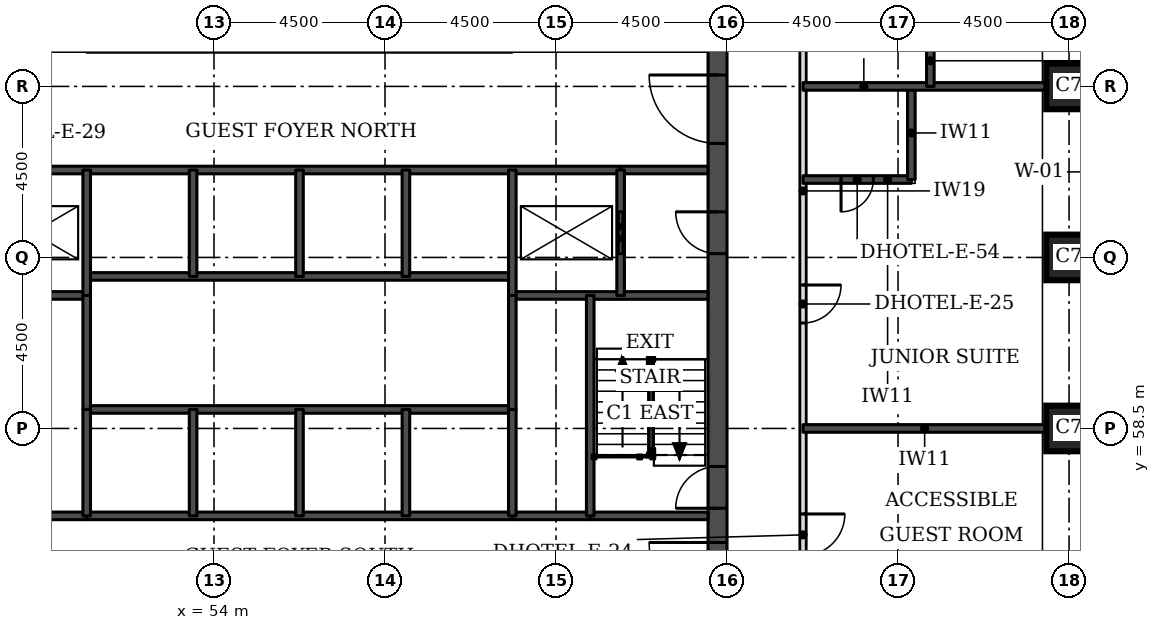
"""IFC4 building model, lengths in metres.
Left out: names, types, materials, properties, quantities, classifications, styles, units other than length and angle.
Written with IfcOpenShell. Run it as: python <this file> out.ifc"""

import sys

from ifc_helpers import new_model, si_unit, direction, frame, frame_2d, origin, origin_2d, place, context, subcontext, project, spatial, rectangle, extrude, element, fill, save


model = new_model("IFC4")
c1 = context("Model", 3, precision=1e-05, world=origin(), true_north=direction((0.0, 1.0)))
c2 = subcontext(c1, "Body", "Model", "MODEL_VIEW")
j1 = project(units=[si_unit("LENGTHUNIT", "METRE"), si_unit("PLANEANGLEUNIT", "RADIAN")], contexts=[c1])
p1 = place(None, origin())
s1 = spatial("IfcSite", under=j1, at=p1, CompositionType="ELEMENT")
p2 = place(p1, origin())
s2 = spatial("IfcBuilding", under=s1, at=p2, CompositionType="ELEMENT")
p3 = place(p2, frame((0.0, 0.0, 62.7)))
s3 = spatial("IfcBuildingStorey", under=s2, at=p3, CompositionType="ELEMENT", Elevation=62.7)
for number, where, z_axis, x_axis in (
    (1, (76.5, 58.5, 0.0), (0.0, 0.0, 1.0), (1.0, 0.0, 0.0)),
    (2, (76.5, 63.0, 0.0), (0.0, 0.0, 1.0), (1.0, 0.0, 0.0)),
    (3, (76.5, 67.5, 0.0), (0.0, 0.0, 1.0), (1.0, 0.0, 0.0)),
):
    element("IfcColumn", number, at=place(p3, frame(where, z_axis=z_axis, x_axis=x_axis)), inside=s3, PredefinedType="COLUMN", context=c2, shape_type="SweptSolid", body=[
        extrude(rectangle(XDim=1.2, YDim=1.2, at=origin_2d()), origin(), (0.0, 0.0, 1.0), 3.3),
    ])
p4 = place(p3, frame((67.25, 49.5, 0.0), z_axis=(0.0, 0.0, 1.0), x_axis=(0.0, 1.0, 0.0)))
e4 = element("IfcWall", 4, at=p4, inside=s3, PredefinedType="SHEAR", context=c2, shape_type="SweptSolid", body=[
    extrude(rectangle(XDim=22.5, YDim=0.5, at=frame_2d((11.25, 0.0))), origin(), (0.0, 0.0, 1.0), 3.3),
])
p5 = place(p4, frame((4.2, 0.0, 0.0)))
e5 = element("IfcOpeningElement", 5, at=p5, cuts=e4, PredefinedType="OPENING", context=c2, shape_type="SweptSolid", body=[
    extrude(rectangle(XDim=1.8, YDim=2.1, at=frame_2d((0.9, 1.05))), frame((0.0, 0.26, 0.0), z_axis=(0.0, -1.0, 0.0), x_axis=(1.0, 0.0, 0.0)), (0.0, 0.0, 1.0), 0.52),
])
p6 = place(p4, frame((6.9, 0.0, 0.0)))
e6 = element("IfcOpeningElement", 6, at=p6, cuts=e4, PredefinedType="OPENING", context=c2, shape_type="SweptSolid", body=[
    extrude(rectangle(XDim=1.1, YDim=2.1, at=frame_2d((0.55, 1.05))), frame((0.0, 0.26, 0.0), z_axis=(0.0, -1.0, 0.0), x_axis=(1.0, 0.0, 0.0)), (0.0, 0.0, 1.0), 0.52),
])
p7 = place(p4, frame((13.6, 0.0, 0.0)))
e7 = element("IfcOpeningElement", 7, at=p7, cuts=e4, PredefinedType="OPENING", context=c2, shape_type="SweptSolid", body=[
    extrude(rectangle(XDim=1.1, YDim=2.1, at=frame_2d((0.55, 1.05))), frame((0.0, 0.26, 0.0), z_axis=(0.0, -1.0, 0.0), x_axis=(1.0, 0.0, 0.0)), (0.0, 0.0, 1.0), 0.52),
])
p8 = place(p4, frame((16.5, 0.0, 0.0)))
e8 = element("IfcOpeningElement", 8, at=p8, cuts=e4, PredefinedType="OPENING", context=c2, shape_type="SweptSolid", body=[
    extrude(rectangle(XDim=1.8, YDim=2.1, at=frame_2d((0.9, 1.05))), frame((0.0, 0.26, 0.0), z_axis=(0.0, -1.0, 0.0), x_axis=(1.0, 0.0, 0.0)), (0.0, 0.0, 1.0), 0.52),
])
p9 = place(p3, frame((69.5, 47.5, 0.0), z_axis=(0.0, 0.0, 1.0), x_axis=(0.0, 1.0, 0.0)))
e9 = element("IfcWall", 9, at=p9, inside=s3, PredefinedType="PARTITIONING", context=c2, shape_type="SweptSolid", body=[
    extrude(rectangle(XDim=26.5, YDim=0.15, at=frame_2d((13.25, 0.0))), origin(), (0.0, 0.0, 1.0), 3.08),
])
p10 = place(p9, frame((25.053, 0.0, 0.0)))
e10 = element("IfcOpeningElement", 10, at=p10, cuts=e9, PredefinedType="OPENING", context=c2, shape_type="SweptSolid", body=[
    extrude(rectangle(XDim=1.0, YDim=2.1, at=frame_2d((0.5, 1.05))), frame((0.0, 0.085, 0.0), z_axis=(0.0, -1.0, 0.0), x_axis=(1.0, 0.0, 0.0)), (0.0, 0.0, 1.0), 0.17),
])
p11 = place(p9, frame((13.775, 0.0, 0.0)))
e11 = element("IfcOpeningElement", 11, at=p11, cuts=e9, PredefinedType="OPENING", context=c2, shape_type="SweptSolid", body=[
    extrude(rectangle(XDim=1.0, YDim=2.1, at=frame_2d((0.5, 1.05))), frame((0.0, 0.085, 0.0), z_axis=(0.0, -1.0, 0.0), x_axis=(1.0, 0.0, 0.0)), (0.0, 0.0, 1.0), 0.17),
])
p12 = place(p9, frame((7.65, 0.0, 0.0)))
e12 = element("IfcOpeningElement", 12, at=p12, cuts=e9, PredefinedType="OPENING", context=c2, shape_type="SweptSolid", body=[
    extrude(rectangle(XDim=1.1, YDim=2.1, at=frame_2d((0.55, 1.05))), frame((0.0, 0.085, 0.0), z_axis=(0.0, -1.0, 0.0), x_axis=(1.0, 0.0, 0.0)), (0.0, 0.0, 1.0), 0.17),
])
p13 = place(p9, frame((0.447, 0.0, 0.0)))
e13 = element("IfcOpeningElement", 13, at=p13, cuts=e9, PredefinedType="OPENING", context=c2, shape_type="SweptSolid", body=[
    extrude(rectangle(XDim=1.0, YDim=2.1, at=frame_2d((0.5, 1.05))), frame((0.0, 0.085, 0.0), z_axis=(0.0, -1.0, 0.0), x_axis=(1.0, 0.0, 0.0)), (0.0, 0.0, 1.0), 0.17),
])
p14 = place(p3, frame((69.5, 58.5, 0.0), z_axis=(0.0, 0.0, 1.0), x_axis=(1.0, 0.0, 0.0)))
e14 = element("IfcWall", 14, at=p14, inside=s3, PredefinedType="SOLIDWALL", context=c2, shape_type="SweptSolid", body=[
    extrude(rectangle(XDim=6.4, YDim=0.2, at=frame_2d((3.2, 0.0))), origin(), (0.0, 0.0, 1.0), 3.08),
])
p15 = place(p3, frame((69.5, 65.05, 0.0), z_axis=(0.0, 0.0, 1.0), x_axis=(1.0, 0.0, 0.0)))
e15 = element("IfcWall", 15, at=p15, inside=s3, PredefinedType="SOLIDWALL", context=c2, shape_type="SweptSolid", body=[
    extrude(rectangle(XDim=2.85, YDim=0.2, at=frame_2d((1.425, 0.0))), origin(), (0.0, 0.0, 1.0), 3.08),
])
p16 = place(p15, frame((1.0, 0.0, 0.0)))
e16 = element("IfcOpeningElement", 16, at=p16, cuts=e15, PredefinedType="OPENING", context=c2, shape_type="SweptSolid", body=[
    extrude(rectangle(XDim=0.85, YDim=2.1, at=frame_2d((0.425, 1.05))), frame((0.0, 0.11, 0.0), z_axis=(0.0, -1.0, 0.0), x_axis=(1.0, 0.0, 0.0)), (0.0, 0.0, 1.0), 0.22),
])
p17 = place(p3, frame((72.35, 65.05, 0.0), z_axis=(0.0, 0.0, 1.0), x_axis=(0.0, 1.0, 0.0)))
e17 = element("IfcWall", 17, at=p17, inside=s3, PredefinedType="SOLIDWALL", context=c2, shape_type="SweptSolid", body=[
    extrude(rectangle(XDim=2.45, YDim=0.2, at=frame_2d((1.225, 0.0))), origin(), (0.0, 0.0, 1.0), 3.08),
])
p18 = place(p3, frame((69.5, 67.5, 0.0), z_axis=(0.0, 0.0, 1.0), x_axis=(1.0, 0.0, 0.0)))
e18 = element("IfcWall", 18, at=p18, inside=s3, PredefinedType="SOLIDWALL", context=c2, shape_type="SweptSolid", body=[
    extrude(rectangle(XDim=6.4, YDim=0.2, at=frame_2d((3.2, 0.0))), origin(), (0.0, 0.0, 1.0), 3.08),
])
p19 = place(p3, frame((72.85, 67.5, 0.0), z_axis=(0.0, 0.0, 1.0), x_axis=(0.0, 1.0, 0.0)))
e19 = element("IfcWall", 19, at=p19, inside=s3, PredefinedType="SOLIDWALL", context=c2, shape_type="SweptSolid", body=[
    extrude(rectangle(XDim=2.95, YDim=0.2, at=frame_2d((1.475, 0.0))), origin(), (0.0, 0.0, 1.0), 3.08),
])
for number, where, z_axis, x_axis in (
    (20, (48.6, 56.2, 0.0), (0.0, 0.0, 1.0), (1.0, 0.0, 0.0)),
    (21, (61.85, 56.2, 0.0), (0.0, 0.0, 1.0), (1.0, 0.0, 0.0)),
):
    element("IfcWall", number, at=place(p3, frame(where, z_axis=z_axis, x_axis=x_axis)), inside=s3, PredefinedType="SOLIDWALL", context=c2, shape_type="SweptSolid", body=[
        extrude(rectangle(XDim=2.05, YDim=0.2, at=frame_2d((1.025, 0.0))), origin(), (0.0, 0.0, 1.0), 3.08),
    ])
p20 = place(p3, frame((50.65, 56.2, 0.0), z_axis=(0.0, 0.0, 1.0), x_axis=(1.0, 0.0, 0.0)))
e22 = element("IfcWall", 22, at=p20, inside=s3, PredefinedType="SOLIDWALL", context=c2, shape_type="SweptSolid", body=[
    extrude(rectangle(XDim=11.2, YDim=0.2, at=frame_2d((5.6, 0.0))), origin(), (0.0, 0.0, 1.0), 3.08),
])
p21 = place(p3, frame((63.9, 56.2, 0.0), z_axis=(0.0, 0.0, 1.0), x_axis=(1.0, 0.0, 0.0)))
e23 = element("IfcWall", 23, at=p21, inside=s3, PredefinedType="SOLIDWALL", context=c2, shape_type="SweptSolid", body=[
    extrude(rectangle(XDim=3.1, YDim=0.2, at=frame_2d((1.55, 0.0))), origin(), (0.0, 0.0, 1.0), 3.08),
])
p22 = place(p3, frame((50.65, 59.0, 0.0), z_axis=(0.0, 0.0, 1.0), x_axis=(1.0, 0.0, 0.0)))
e24 = element("IfcWall", 24, at=p22, inside=s3, PredefinedType="SOLIDWALL", context=c2, shape_type="SweptSolid", body=[
    extrude(rectangle(XDim=11.2, YDim=0.2, at=frame_2d((5.6, 0.0))), origin(), (0.0, 0.0, 1.0), 3.3),
])
for number, where, z_axis, x_axis in (
    (25, (45.5, 62.0, 0.0), (0.0, 0.0, 1.0), (1.0, 0.0, 0.0)),
    (26, (61.85, 62.0, 0.0), (0.0, 0.0, 1.0), (1.0, 0.0, 0.0)),
):
    element("IfcWall", number, at=place(p3, frame(where, z_axis=z_axis, x_axis=x_axis)), inside=s3, PredefinedType="SOLIDWALL", context=c2, shape_type="SweptSolid", body=[
        extrude(rectangle(XDim=5.15, YDim=0.2, at=frame_2d((2.575, 0.0))), origin(), (0.0, 0.0, 1.0), 3.08),
    ])
p23 = place(p3, frame((50.65, 62.5, 0.0), z_axis=(0.0, 0.0, 1.0), x_axis=(1.0, 0.0, 0.0)))
e27 = element("IfcWall", 27, at=p23, inside=s3, PredefinedType="SOLIDWALL", context=c2, shape_type="SweptSolid", body=[
    extrude(rectangle(XDim=11.2, YDim=0.2, at=frame_2d((5.6, 0.0))), origin(), (0.0, 0.0, 1.0), 3.3),
])
p24 = place(p3, frame((64.7, 65.3, 0.0), z_axis=(0.0, 0.0, 1.0), x_axis=(1.0, 0.0, 0.0)))
e28 = element("IfcWall", 28, at=p24, inside=s3, PredefinedType="SOLIDWALL", context=c2, shape_type="SweptSolid", body=[
    extrude(rectangle(XDim=2.3, YDim=0.2, at=frame_2d((1.15, 0.0))), origin(), (0.0, 0.0, 1.0), 3.08),
])
p25 = place(p3, frame((47.8, 65.3, 0.0), z_axis=(0.0, 0.0, 1.0), x_axis=(1.0, 0.0, 0.0)))
e29 = element("IfcWall", 29, at=p25, inside=s3, PredefinedType="SOLIDWALL", context=c2, shape_type="SweptSolid", body=[
    extrude(rectangle(XDim=16.9, YDim=0.2, at=frame_2d((8.45, 0.0))), origin(), (0.0, 0.0, 1.0), 3.08),
])
p26 = place(p3, frame((50.65, 59.0, 0.0), z_axis=(0.0, 0.0, 1.0), x_axis=(0.0, 1.0, 0.0)))
e30 = element("IfcWall", 30, at=p26, inside=s3, PredefinedType="SOLIDWALL", context=c2, shape_type="SweptSolid", body=[
    extrude(rectangle(XDim=3.0, YDim=0.2, at=frame_2d((1.5, 0.0))), origin(), (0.0, 0.0, 1.0), 3.3),
])
p27 = place(p3, frame((50.65, 56.2, 0.0), z_axis=(0.0, 0.0, 1.0), x_axis=(0.0, 1.0, 0.0)))
e31 = element("IfcWall", 31, at=p27, inside=s3, PredefinedType="SOLIDWALL", context=c2, shape_type="SweptSolid", body=[
    extrude(rectangle(XDim=2.8, YDim=0.2, at=frame_2d((1.4, 0.0))), origin(), (0.0, 0.0, 1.0), 3.08),
])
p28 = place(p3, frame((50.65, 62.0, 0.0), z_axis=(0.0, 0.0, 1.0), x_axis=(0.0, 1.0, 0.0)))
e32 = element("IfcWall", 32, at=p28, inside=s3, PredefinedType="SOLIDWALL", context=c2, shape_type="SweptSolid", body=[
    extrude(rectangle(XDim=3.3, YDim=0.2, at=frame_2d((1.65, 0.0))), origin(), (0.0, 0.0, 1.0), 3.08),
])
for number, where, z_axis, x_axis in (
    (33, (53.45, 56.2, 0.0), (0.0, 0.0, 1.0), (0.0, 1.0, 0.0)),
    (34, (53.45, 62.5, 0.0), (0.0, 0.0, 1.0), (0.0, 1.0, 0.0)),
    (35, (56.25, 56.2, 0.0), (0.0, 0.0, 1.0), (0.0, 1.0, 0.0)),
    (36, (56.25, 62.5, 0.0), (0.0, 0.0, 1.0), (0.0, 1.0, 0.0)),
    (37, (59.05, 56.2, 0.0), (0.0, 0.0, 1.0), (0.0, 1.0, 0.0)),
    (38, (59.05, 62.5, 0.0), (0.0, 0.0, 1.0), (0.0, 1.0, 0.0)),
):
    element("IfcWall", number, at=place(p3, frame(where, z_axis=z_axis, x_axis=x_axis)), inside=s3, PredefinedType="SOLIDWALL", context=c2, shape_type="SweptSolid", body=[
        extrude(rectangle(XDim=2.8, YDim=0.2, at=frame_2d((1.4, 0.0))), origin(), (0.0, 0.0, 1.0), 3.08),
    ])
p29 = place(p3, frame((61.85, 59.0, 0.0), z_axis=(0.0, 0.0, 1.0), x_axis=(0.0, 1.0, 0.0)))
e39 = element("IfcWall", 39, at=p29, inside=s3, PredefinedType="SOLIDWALL", context=c2, shape_type="SweptSolid", body=[
    extrude(rectangle(XDim=3.0, YDim=0.2, at=frame_2d((1.5, 0.0))), origin(), (0.0, 0.0, 1.0), 3.3),
])
p30 = place(p3, frame((61.85, 56.2, 0.0), z_axis=(0.0, 0.0, 1.0), x_axis=(0.0, 1.0, 0.0)))
e40 = element("IfcWall", 40, at=p30, inside=s3, PredefinedType="SOLIDWALL", context=c2, shape_type="SweptSolid", body=[
    extrude(rectangle(XDim=2.8, YDim=0.2, at=frame_2d((1.4, 0.0))), origin(), (0.0, 0.0, 1.0), 3.08),
])
p31 = place(p3, frame((61.85, 62.0, 0.0), z_axis=(0.0, 0.0, 1.0), x_axis=(0.0, 1.0, 0.0)))
e41 = element("IfcWall", 41, at=p31, inside=s3, PredefinedType="SOLIDWALL", context=c2, shape_type="SweptSolid", body=[
    extrude(rectangle(XDim=3.3, YDim=0.2, at=frame_2d((1.65, 0.0))), origin(), (0.0, 0.0, 1.0), 3.08),
])
p32 = place(p3, frame((63.9, 56.2, 0.0), z_axis=(0.0, 0.0, 1.0), x_axis=(0.0, 1.0, 0.0)))
e42 = element("IfcWall", 42, at=p32, inside=s3, PredefinedType="SOLIDWALL", context=c2, shape_type="SweptSolid", body=[
    extrude(rectangle(XDim=5.8, YDim=0.2, at=frame_2d((2.9, 0.0))), origin(), (0.0, 0.0, 1.0), 3.08),
])
p33 = place(p3, frame((64.7, 62.0, 0.0), z_axis=(0.0, 0.0, 1.0), x_axis=(0.0, 1.0, 0.0)))
e43 = element("IfcWall", 43, at=p33, inside=s3, PredefinedType="SOLIDWALL", context=c2, shape_type="SweptSolid", body=[
    extrude(rectangle(XDim=3.3, YDim=0.2, at=frame_2d((1.65, 0.0))), origin(), (0.0, 0.0, 1.0), 3.08),
])
p34 = place(p33, frame((1.1, 0.0, 0.0)))
e44 = element("IfcOpeningElement", 44, at=p34, cuts=e43, PredefinedType="OPENING", context=c2, shape_type="SweptSolid", body=[
    extrude(rectangle(XDim=1.1, YDim=2.1, at=frame_2d((0.55, 1.05))), frame((0.0, 0.11, 0.0), z_axis=(0.0, -1.0, 0.0), x_axis=(1.0, 0.0, 0.0)), (0.0, 0.0, 1.0), 0.22),
])
p35 = place(p11, frame((1.0, 0.0, 0.0), z_axis=(0.0, 0.0, 1.0), x_axis=(-1.0, 0.0, 0.0)))
e45 = element("IfcDoor", 45, at=p35, inside=s3, OperationType="SINGLE_SWING_LEFT", PredefinedType="DOOR", context=c2, shape_type="SweptSolid", body=[
    extrude(rectangle(XDim=1.0, YDim=2.1, at=frame_2d((0.5, 1.05))), frame((0.0, 0.025, 0.0), z_axis=(0.0, -1.0, 0.0), x_axis=(1.0, 0.0, 0.0)), (0.0, 0.0, 1.0), 0.05),
])
fill(e11, e45)
p36 = place(p16, frame((0.85, 0.0, 0.0), z_axis=(0.0, 0.0, 1.0), x_axis=(-1.0, 0.0, 0.0)))
e46 = element("IfcDoor", 46, at=p36, inside=s3, OperationType="SINGLE_SWING_RIGHT", PredefinedType="DOOR", context=c2, shape_type="SweptSolid", body=[
    extrude(rectangle(XDim=0.85, YDim=2.1, at=frame_2d((0.425, 1.05))), frame((0.0, 0.025, 0.0), z_axis=(0.0, -1.0, 0.0), x_axis=(1.0, 0.0, 0.0)), (0.0, 0.0, 1.0), 0.05),
])
fill(e16, e46)
p37 = place(p12, frame((1.1, 0.0, 0.0), z_axis=(0.0, 0.0, 1.0), x_axis=(-1.0, 0.0, 0.0)))
e47 = element("IfcDoor", 47, at=p37, inside=s3, OperationType="SINGLE_SWING_LEFT", PredefinedType="DOOR", context=c2, shape_type="SweptSolid", body=[
    extrude(rectangle(XDim=1.1, YDim=2.1, at=frame_2d((0.55, 1.05))), frame((0.0, 0.025, 0.0), z_axis=(0.0, -1.0, 0.0), x_axis=(1.0, 0.0, 0.0)), (0.0, 0.0, 1.0), 0.05),
])
fill(e12, e47)
p38 = place(p34, origin())
e48 = element("IfcDoor", 48, at=p38, inside=s3, OperationType="DOUBLE_DOOR_SLIDING", PredefinedType="DOOR", context=c2, shape_type="SweptSolid", body=[
    extrude(rectangle(XDim=1.1, YDim=2.1, at=frame_2d((0.55, 1.05))), frame((0.0, 0.025, 0.0), z_axis=(0.0, -1.0, 0.0), x_axis=(1.0, 0.0, 0.0)), (0.0, 0.0, 1.0), 0.05),
])
fill(e44, e48)
p39 = place(p5, origin())
e49 = element("IfcDoor", 49, at=p39, inside=s3, OperationType="SINGLE_SWING_RIGHT", PredefinedType="DOOR", context=c2, shape_type="SweptSolid", body=[
    extrude(rectangle(XDim=1.8, YDim=2.1, at=frame_2d((0.9, 1.05))), frame((0.0, 0.025, 0.0), z_axis=(0.0, -1.0, 0.0), x_axis=(1.0, 0.0, 0.0)), (0.0, 0.0, 1.0), 0.05),
])
fill(e5, e49)
p40 = place(p6, origin())
e50 = element("IfcDoor", 50, at=p40, inside=s3, OperationType="SINGLE_SWING_LEFT", PredefinedType="DOOR", context=c2, shape_type="SweptSolid", body=[
    extrude(rectangle(XDim=1.1, YDim=2.1, at=frame_2d((0.55, 1.05))), frame((0.0, 0.025, 0.0), z_axis=(0.0, -1.0, 0.0), x_axis=(1.0, 0.0, 0.0)), (0.0, 0.0, 1.0), 0.05),
])
fill(e6, e50)
p41 = place(p7, origin())
e51 = element("IfcDoor", 51, at=p41, inside=s3, OperationType="SINGLE_SWING_RIGHT", PredefinedType="DOOR", context=c2, shape_type="SweptSolid", body=[
    extrude(rectangle(XDim=1.1, YDim=2.1, at=frame_2d((0.55, 1.05))), frame((0.0, 0.025, 0.0), z_axis=(0.0, -1.0, 0.0), x_axis=(1.0, 0.0, 0.0)), (0.0, 0.0, 1.0), 0.05),
])
fill(e7, e51)
p42 = place(p8, origin())
e52 = element("IfcDoor", 52, at=p42, inside=s3, OperationType="SINGLE_SWING_RIGHT", PredefinedType="DOOR", context=c2, shape_type="SweptSolid", body=[
    extrude(rectangle(XDim=1.8, YDim=2.1, at=frame_2d((0.9, 1.05))), frame((0.0, 0.025, 0.0), z_axis=(0.0, -1.0, 0.0), x_axis=(1.0, 0.0, 0.0)), (0.0, 0.0, 1.0), 0.05),
])
fill(e8, e52)
save(model, sys.argv[1])
